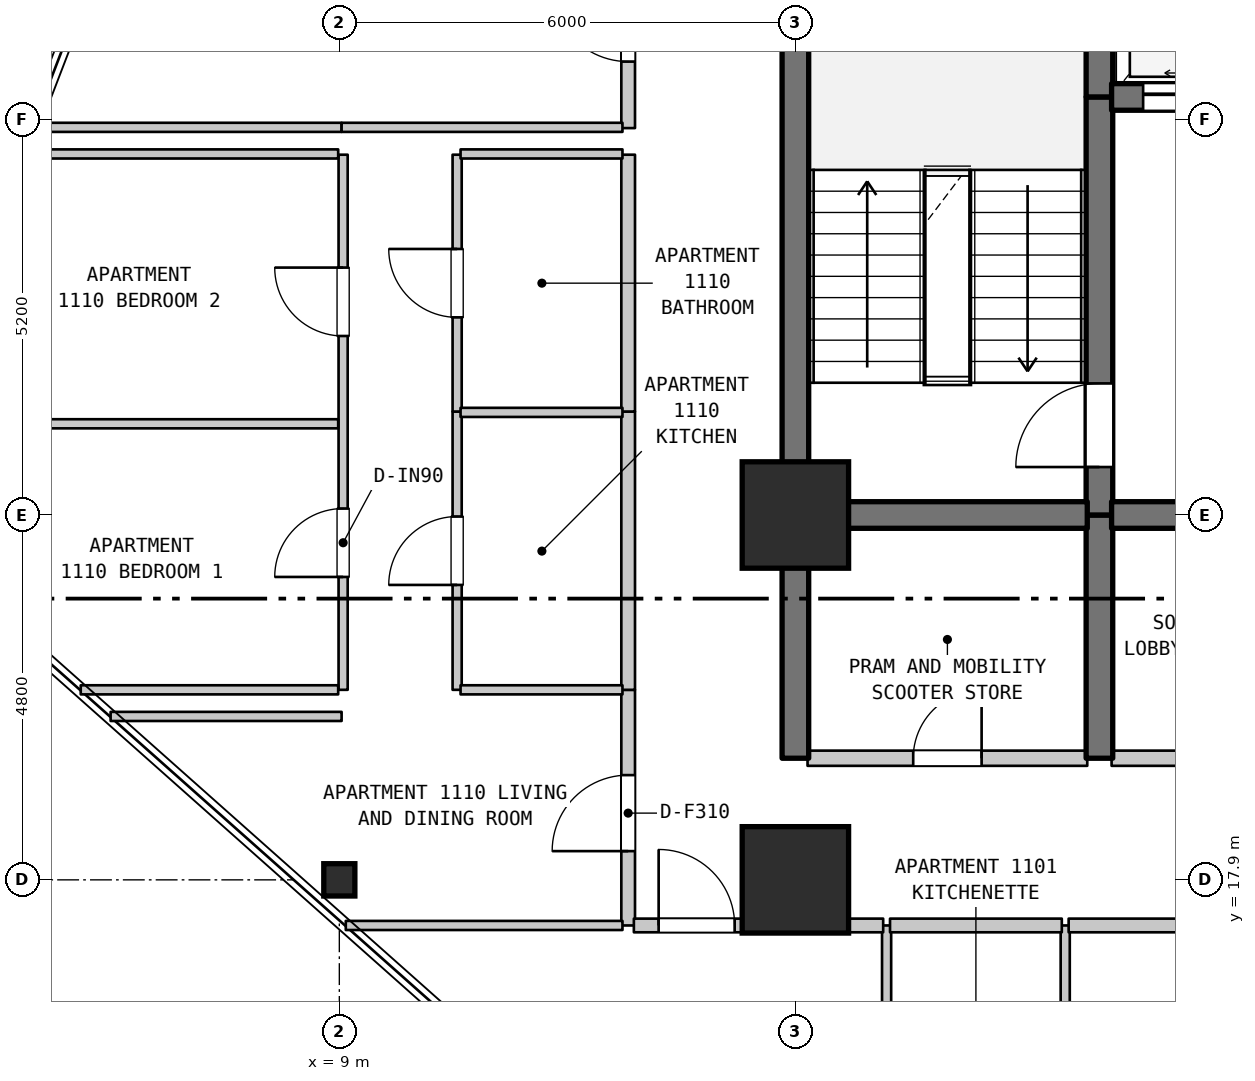
"""IFC4 building model, lengths in metres.
Left out: names, types, materials, properties, quantities, classifications, styles, units other than length and angle.
Written with IfcOpenShell. Run it as: python <this file> out.ifc"""

import sys

from ifc_helpers import new_model, si_unit, direction, frame, frame_2d, origin, origin_2d, place, context, subcontext, project, spatial, rectangle, i_section, extrude, element, fill, save


model = new_model("IFC4")
c1 = context("Model", 3, precision=1e-05, world=origin(), true_north=direction((0.0, 1.0)))
c2 = subcontext(c1, "Body", "Model", "MODEL_VIEW")
j1 = project(units=[si_unit("LENGTHUNIT", "METRE"), si_unit("PLANEANGLEUNIT", "RADIAN")], contexts=[c1])
p1 = place(None, origin())
s1 = spatial("IfcSite", under=j1, at=p1, CompositionType="ELEMENT")
p2 = place(p1, origin())
s2 = spatial("IfcBuilding", under=s1, at=p2, CompositionType="ELEMENT")
p3 = place(p2, frame((0.0, 0.0, 49.9)))
s3 = spatial("IfcBuildingStorey", under=s2, at=p3, CompositionType="ELEMENT", Elevation=49.9)
p4 = place(p3, frame((9.0, 17.9, 0.0), z_axis=(0.0, 0.0, 1.0), x_axis=(1.0, 0.0, 0.0)))
e1 = element("IfcColumn", 1, at=p4, inside=s3, PredefinedType="COLUMN", context=c2, shape_type="SweptSolid", body=[
    extrude(i_section(OverallWidth=0.409, OverallDepth=0.425, WebThickness=0.032, FlangeThickness=0.052, FilletRadius=0.015, at=origin_2d()), origin(), (0.0, 0.0, 1.0), 3.7),
])
for number, where, z_axis, x_axis in (
    (2, (15.0, 17.9, 0.0), (0.0, 0.0, 1.0), (1.0, 0.0, 0.0)),
    (3, (15.0, 22.7, 0.0), (0.0, 0.0, 1.0), (1.0, 0.0, 0.0)),
):
    element("IfcColumn", number, at=place(p3, frame(where, z_axis=z_axis, x_axis=x_axis)), inside=s3, PredefinedType="COLUMN", context=c2, shape_type="SweptSolid", body=[
        extrude(rectangle(XDim=1.4, YDim=1.4, at=origin_2d()), origin(), (0.0, 0.0, 1.0), 3.7),
    ])
p5 = place(p3, frame((9.05, 20.4, 0.0), z_axis=(0.0, 0.0, 1.0), x_axis=(0.0, 1.0, 0.0)))
e4 = element("IfcWall", 4, at=p5, inside=s3, PredefinedType="PARTITIONING", context=c2, shape_type="SweptSolid", body=[
    extrude(rectangle(XDim=7.04, YDim=0.12, at=frame_2d((3.52, 0.0))), origin(), (0.0, 0.0, 1.0), 2.785),
])
p6 = place(p5, frame((1.485, 0.0, 0.0)))
e5 = element("IfcOpeningElement", 5, at=p6, cuts=e4, PredefinedType="OPENING", context=c2, shape_type="SweptSolid", body=[
    extrude(rectangle(XDim=0.9, YDim=2.15, at=frame_2d((0.45, 1.075))), frame((0.0, 0.07, 0.0), z_axis=(0.0, -1.0, 0.0), x_axis=(1.0, 0.0, 0.0)), (0.0, 0.0, 1.0), 0.14),
])
p7 = place(p5, frame((4.655, 0.0, 0.0)))
e6 = element("IfcOpeningElement", 6, at=p7, cuts=e4, PredefinedType="OPENING", context=c2, shape_type="SweptSolid", body=[
    extrude(rectangle(XDim=0.9, YDim=2.15, at=frame_2d((0.45, 1.075))), frame((0.0, 0.07, 0.0), z_axis=(0.0, -1.0, 0.0), x_axis=(1.0, 0.0, 0.0)), (0.0, 0.0, 1.0), 0.14),
])
p8 = place(p3, frame((10.55, 20.4, 0.0), z_axis=(0.0, 0.0, 1.0), x_axis=(0.0, 1.0, 0.0)))
e7 = element("IfcWall", 7, at=p8, inside=s3, PredefinedType="PARTITIONING", context=c2, shape_type="SweptSolid", body=[
    extrude(rectangle(XDim=3.661, YDim=0.12, at=frame_2d((1.831, 0.0))), origin(), (0.0, 0.0, 1.0), 3.385),
])
p9 = place(p8, frame((1.38, 0.0, 0.0)))
e8 = element("IfcOpeningElement", 8, at=p9, cuts=e7, PredefinedType="OPENING", context=c2, shape_type="SweptSolid", body=[
    extrude(rectangle(XDim=0.9, YDim=2.15, at=frame_2d((0.45, 1.075))), frame((0.0, 0.07, 0.0), z_axis=(0.0, -1.0, 0.0), x_axis=(1.0, 0.0, 0.0)), (0.0, 0.0, 1.0), 0.14),
])
p10 = place(p3, frame((10.55, 24.061, 0.0), z_axis=(0.0, 0.0, 1.0), x_axis=(0.0, 1.0, 0.0)))
e9 = element("IfcWall", 9, at=p10, inside=s3, PredefinedType="PARTITIONING", context=c2, shape_type="SweptSolid", body=[
    extrude(rectangle(XDim=3.379, YDim=0.12, at=frame_2d((1.689, 0.0))), origin(), (0.0, 0.0, 1.0), 3.385),
])
p11 = place(p10, frame((1.239, 0.0, 0.0)))
e10 = element("IfcOpeningElement", 10, at=p11, cuts=e9, PredefinedType="OPENING", context=c2, shape_type="SweptSolid", body=[
    extrude(rectangle(XDim=0.9, YDim=2.1, at=frame_2d((0.45, 1.05))), frame((0.0, 0.07, 0.0), z_axis=(0.0, -1.0, 0.0), x_axis=(1.0, 0.0, 0.0)), (0.0, 0.0, 1.0), 0.14),
])
p12 = place(p3, frame((12.8, 17.3, 0.0), z_axis=(0.0, 0.0, 1.0), x_axis=(0.0, 1.0, 0.0)))
e11 = element("IfcWall", 11, at=p12, inside=s3, PredefinedType="STANDARD", context=c2, shape_type="SweptSolid", body=[
    extrude(rectangle(XDim=3.1, YDim=0.18, at=frame_2d((1.55, 0.0))), origin(), (0.0, 0.0, 1.0), 3.385),
])
p13 = place(p12, frame((0.978, 0.0, 0.0)))
e12 = element("IfcOpeningElement", 12, at=p13, cuts=e11, PredefinedType="OPENING", context=c2, shape_type="SweptSolid", body=[
    extrude(rectangle(XDim=1.0, YDim=2.15, at=frame_2d((0.5, 1.075))), frame((0.0, 0.1, 0.0), z_axis=(0.0, -1.0, 0.0), x_axis=(1.0, 0.0, 0.0)), (0.0, 0.0, 1.0), 0.2),
])
p14 = place(p3, frame((12.8, 20.4, 0.0), z_axis=(0.0, 0.0, 1.0), x_axis=(0.0, 1.0, 0.0)))
e13 = element("IfcWall", 13, at=p14, inside=s3, PredefinedType="STANDARD", context=c2, shape_type="SweptSolid", body=[
    extrude(rectangle(XDim=3.661, YDim=0.18, at=frame_2d((1.831, 0.0))), origin(), (0.0, 0.0, 1.0), 3.385),
])
p15 = place(p3, frame((12.8, 24.061, 0.0), z_axis=(0.0, 0.0, 1.0), x_axis=(0.0, 1.0, 0.0)))
e14 = element("IfcWall", 14, at=p15, inside=s3, PredefinedType="STANDARD", context=c2, shape_type="SweptSolid", body=[
    extrude(rectangle(XDim=3.379, YDim=0.18, at=frame_2d((1.689, 0.0))), origin(), (0.0, 0.0, 1.0), 3.385),
])
p16 = place(p3, frame((12.8, 27.79, 0.0), z_axis=(0.0, 0.0, 1.0), x_axis=(0.0, 1.0, 0.0)))
e15 = element("IfcWall", 15, at=p16, inside=s3, PredefinedType="STANDARD", context=c2, shape_type="SweptSolid", body=[
    extrude(rectangle(XDim=2.75, YDim=0.18, at=frame_2d((1.375, 0.0))), origin(), (0.0, 0.0, 1.0), 3.385),
])
p17 = place(p16, frame((0.875, 0.0, 0.0)))
e16 = element("IfcOpeningElement", 16, at=p17, cuts=e15, PredefinedType="OPENING", context=c2, shape_type="SweptSolid", body=[
    extrude(rectangle(XDim=1.0, YDim=2.15, at=frame_2d((0.5, 1.075))), frame((0.0, 0.1, 0.0), z_axis=(0.0, -1.0, 0.0), x_axis=(1.0, 0.0, 0.0)), (0.0, 0.0, 1.0), 0.2),
])
p18 = place(p3, frame((15.0, 19.5, 0.0), z_axis=(0.0, 0.0, 1.0), x_axis=(0.0, 1.0, 0.0)))
e17 = element("IfcWall", 17, at=p18, inside=s3, PredefinedType="SHEAR", context=c2, shape_type="SweptSolid", body=[
    extrude(rectangle(XDim=3.2, YDim=0.35, at=frame_2d((1.6, 0.0))), origin(), (0.0, 0.0, 1.0), 3.385),
])
p19 = place(p3, frame((15.0, 22.7, 0.0), z_axis=(0.0, 0.0, 1.0), x_axis=(0.0, 1.0, 0.0)))
e18 = element("IfcWall", 18, at=p19, inside=s3, PredefinedType="SHEAR", context=c2, shape_type="SweptSolid", body=[
    extrude(rectangle(XDim=6.8, YDim=0.35, at=frame_2d((3.4, 0.0))), origin(), (0.0, 0.0, 1.0), 3.385),
])
p20 = place(p3, frame((16.2, 14.1, 0.0), z_axis=(0.0, 0.0, 1.0), x_axis=(0.0, 1.0, 0.0)))
e19 = element("IfcWall", 19, at=p20, inside=s3, PredefinedType="PARTITIONING", context=c2, shape_type="SweptSolid", body=[
    extrude(rectangle(XDim=3.2, YDim=0.12, at=frame_2d((1.6, 0.0))), origin(), (0.0, 0.0, 1.0), 3.385),
])
p21 = place(p20, frame((1.15, 0.0, 0.0)))
e20 = element("IfcOpeningElement", 20, at=p21, cuts=e19, PredefinedType="OPENING", context=c2, shape_type="SweptSolid", body=[
    extrude(rectangle(XDim=0.9, YDim=2.15, at=frame_2d((0.45, 1.075))), frame((0.0, 0.07, 0.0), z_axis=(0.0, -1.0, 0.0), x_axis=(1.0, 0.0, 0.0)), (0.0, 0.0, 1.0), 0.14),
])
p22 = place(p3, frame((18.55, 14.1, 0.0), z_axis=(0.0, 0.0, 1.0), x_axis=(0.0, 1.0, 0.0)))
e21 = element("IfcWall", 21, at=p22, inside=s3, PredefinedType="PARTITIONING", context=c2, shape_type="SweptSolid", body=[
    extrude(rectangle(XDim=3.2, YDim=0.12, at=frame_2d((1.6, 0.0))), origin(), (0.0, 0.0, 1.0), 3.385),
])
p23 = place(p3, frame((19.0, 19.5, 0.0), z_axis=(0.0, 0.0, 1.0), x_axis=(0.0, 1.0, 0.0)))
e22 = element("IfcWall", 22, at=p23, inside=s3, PredefinedType="SHEAR", context=c2, shape_type="SweptSolid", body=[
    extrude(rectangle(XDim=3.2, YDim=0.35, at=frame_2d((1.6, 0.0))), origin(), (0.0, 0.0, 1.0), 3.385),
])
p24 = place(p3, frame((19.0, 22.7, 0.0), z_axis=(0.0, 0.0, 1.0), x_axis=(0.0, 1.0, 0.0)))
e23 = element("IfcWall", 23, at=p24, inside=s3, PredefinedType="SHEAR", context=c2, shape_type="SweptSolid", body=[
    extrude(rectangle(XDim=5.5, YDim=0.35, at=frame_2d((2.75, 0.0))), origin(), (0.0, 0.0, 1.0), 3.385),
])
p25 = place(p24, frame((0.631, 0.0, 0.0)))
e24 = element("IfcOpeningElement", 24, at=p25, cuts=e23, PredefinedType="OPENING", context=c2, shape_type="SweptSolid", body=[
    extrude(rectangle(XDim=1.1, YDim=2.15, at=frame_2d((0.55, 1.075))), frame((0.0, 0.185, 0.0), z_axis=(0.0, -1.0, 0.0), x_axis=(1.0, 0.0, 0.0)), (0.0, 0.0, 1.0), 0.37),
])
p26 = place(p3, frame((19.0, 28.2, 0.0), z_axis=(0.0, 0.0, 1.0), x_axis=(0.0, 1.0, 0.0)))
e25 = element("IfcWall", 25, at=p26, inside=s3, PredefinedType="SHEAR", context=c2, shape_type="SweptSolid", body=[
    extrude(rectangle(XDim=1.3, YDim=0.35, at=frame_2d((0.65, 0.0))), origin(), (0.0, 0.0, 1.0), 3.385),
])
p27 = place(p3, frame((9.085, 17.3, 0.0), z_axis=(0.0, 0.0, 1.0), x_axis=(1.0, 0.0, 0.0)))
e26 = element("IfcWall", 26, at=p27, inside=s3, PredefinedType="PARTITIONING", context=c2, shape_type="SweptSolid", body=[
    extrude(rectangle(XDim=3.64, YDim=0.12, at=frame_2d((1.82, 0.0))), origin(), (0.0, 0.0, 1.0), 3.385),
])
p28 = place(p3, frame((12.875, 17.3, 0.0), z_axis=(0.0, 0.0, 1.0), x_axis=(1.0, 0.0, 0.0)))
e27 = element("IfcWall", 27, at=p28, inside=s3, PredefinedType="STANDARD", context=c2, shape_type="SweptSolid", body=[
    extrude(rectangle(XDim=3.28, YDim=0.18, at=frame_2d((1.64, 0.0))), origin(), (0.0, 0.0, 1.0), 3.385),
])
p29 = place(p28, frame((0.326, 0.0, 0.0)))
e28 = element("IfcOpeningElement", 28, at=p29, cuts=e27, PredefinedType="OPENING", context=c2, shape_type="SweptSolid", body=[
    extrude(rectangle(XDim=1.0, YDim=2.15, at=frame_2d((0.5, 1.075))), frame((0.0, 0.1, 0.0), z_axis=(0.0, -1.0, 0.0), x_axis=(1.0, 0.0, 0.0)), (0.0, 0.0, 1.0), 0.2),
])
p30 = place(p3, frame((16.245, 17.3, 0.0), z_axis=(0.0, 0.0, 1.0), x_axis=(1.0, 0.0, 0.0)))
e29 = element("IfcWall", 29, at=p30, inside=s3, PredefinedType="STANDARD", context=c2, shape_type="SweptSolid", body=[
    extrude(rectangle(XDim=2.26, YDim=0.18, at=frame_2d((1.13, 0.0))), origin(), (0.0, 0.0, 1.0), 3.385),
])
p31 = place(p3, frame((18.595, 17.3, 0.0), z_axis=(0.0, 0.0, 1.0), x_axis=(1.0, 0.0, 0.0)))
e30 = element("IfcWall", 30, at=p31, inside=s3, PredefinedType="STANDARD", context=c2, shape_type="SweptSolid", body=[
    extrude(rectangle(XDim=1.86, YDim=0.18, at=frame_2d((0.93, 0.0))), origin(), (0.0, 0.0, 1.0), 3.385),
])
p32 = place(p3, frame((15.16, 19.5, 0.0), z_axis=(0.0, 0.0, 1.0), x_axis=(1.0, 0.0, 0.0)))
e31 = element("IfcWall", 31, at=p32, inside=s3, PredefinedType="STANDARD", context=c2, shape_type="SweptSolid", body=[
    extrude(rectangle(XDim=3.68, YDim=0.2, at=frame_2d((1.84, 0.0))), origin(), (0.0, 0.0, 1.0), 3.385),
])
p33 = place(p32, frame((1.39, 0.0, 0.0)))
e32 = element("IfcOpeningElement", 32, at=p33, cuts=e31, PredefinedType="OPENING", context=c2, shape_type="SweptSolid", body=[
    extrude(rectangle(XDim=0.9, YDim=2.15, at=frame_2d((0.45, 1.075))), frame((0.0, 0.11, 0.0), z_axis=(0.0, -1.0, 0.0), x_axis=(1.0, 0.0, 0.0)), (0.0, 0.0, 1.0), 0.22),
])
p34 = place(p3, frame((19.16, 19.5, 0.0), z_axis=(0.0, 0.0, 1.0), x_axis=(1.0, 0.0, 0.0)))
e33 = element("IfcWall", 33, at=p34, inside=s3, PredefinedType="STANDARD", context=c2, shape_type="SweptSolid", body=[
    extrude(rectangle(XDim=4.48, YDim=0.2, at=frame_2d((2.24, 0.0))), origin(), (0.0, 0.0, 1.0), 3.385),
])
p35 = place(p34, frame((1.64, 0.0, 0.0)))
e34 = element("IfcOpeningElement", 34, at=p35, cuts=e33, PredefinedType="OPENING", context=c2, shape_type="SweptSolid", body=[
    extrude(rectangle(XDim=1.2, YDim=2.2, at=frame_2d((0.6, 1.1))), frame((0.0, 0.11, 0.0), z_axis=(0.0, -1.0, 0.0), x_axis=(1.0, 0.0, 0.0)), (0.0, 0.0, 1.0), 0.22),
])
p36 = place(p3, frame((5.991, 20.05, 0.0), z_axis=(0.0, 0.0, 1.0), x_axis=(1.0, 0.0, 0.0)))
e35 = element("IfcWall", 35, at=p36, inside=s3, PredefinedType="PARTITIONING", context=c2, shape_type="SweptSolid", body=[
    extrude(rectangle(XDim=3.039, YDim=0.12, at=frame_2d((1.52, 0.0))), origin(), (0.0, 0.0, 1.0), 3.385),
])
p37 = place(p3, frame((5.598, 20.4, 0.0), z_axis=(0.0, 0.0, 1.0), x_axis=(1.0, 0.0, 0.0)))
e36 = element("IfcWall", 36, at=p37, inside=s3, PredefinedType="PARTITIONING", context=c2, shape_type="SweptSolid", body=[
    extrude(rectangle(XDim=3.387, YDim=0.12, at=frame_2d((1.694, 0.0))), origin(), (0.0, 0.0, 1.0), 3.385),
])
p38 = place(p3, frame((10.595, 20.4, 0.0), z_axis=(0.0, 0.0, 1.0), x_axis=(1.0, 0.0, 0.0)))
e37 = element("IfcWall", 37, at=p38, inside=s3, PredefinedType="PARTITIONING", context=c2, shape_type="SweptSolid", body=[
    extrude(rectangle(XDim=2.13, YDim=0.12, at=frame_2d((1.065, 0.0))), origin(), (0.0, 0.0, 1.0), 3.385),
])
p39 = place(p3, frame((15.16, 22.7, 0.0), z_axis=(0.0, 0.0, 1.0), x_axis=(1.0, 0.0, 0.0)))
e38 = element("IfcWall", 38, at=p39, inside=s3, PredefinedType="SHEAR", context=c2, shape_type="SweptSolid", body=[
    extrude(rectangle(XDim=3.68, YDim=0.35, at=frame_2d((1.84, 0.0))), origin(), (0.0, 0.0, 1.0), 3.385),
])
p40 = place(p3, frame((19.16, 22.7, 0.0), z_axis=(0.0, 0.0, 1.0), x_axis=(1.0, 0.0, 0.0)))
e39 = element("IfcWall", 39, at=p40, inside=s3, PredefinedType="SHEAR", context=c2, shape_type="SweptSolid", body=[
    extrude(rectangle(XDim=4.48, YDim=0.35, at=frame_2d((2.24, 0.0))), origin(), (0.0, 0.0, 1.0), 3.385),
])
p41 = place(p40, frame((1.64, 0.0, 0.0)))
e40 = element("IfcOpeningElement", 40, at=p41, cuts=e39, PredefinedType="OPENING", context=c2, shape_type="SweptSolid", body=[
    extrude(rectangle(XDim=1.2, YDim=2.2, at=frame_2d((0.6, 1.1))), frame((0.0, 0.185, 0.0), z_axis=(0.0, -1.0, 0.0), x_axis=(1.0, 0.0, 0.0)), (0.0, 0.0, 1.0), 0.37),
])
p42 = place(p3, frame((3.501, 23.9, 0.0), z_axis=(0.0, 0.0, 1.0), x_axis=(1.0, 0.0, 0.0)))
e41 = element("IfcWall", 41, at=p42, inside=s3, PredefinedType="PARTITIONING", context=c2, shape_type="SweptSolid", body=[
    extrude(rectangle(XDim=5.484, YDim=0.12, at=frame_2d((2.742, 0.0))), origin(), (0.0, 0.0, 1.0), 3.385),
])
p43 = place(p3, frame((10.595, 24.05, 0.0), z_axis=(0.0, 0.0, 1.0), x_axis=(1.0, 0.0, 0.0)))
e42 = element("IfcWall", 42, at=p43, inside=s3, PredefinedType="PARTITIONING", context=c2, shape_type="SweptSolid", body=[
    extrude(rectangle(XDim=2.13, YDim=0.12, at=frame_2d((1.065, 0.0))), origin(), (0.0, 0.0, 1.0), 3.385),
])
p44 = place(p3, frame((4.837, 27.45, 0.0), z_axis=(0.0, 0.0, 1.0), x_axis=(1.0, 0.0, 0.0)))
e43 = element("IfcWall", 43, at=p44, inside=s3, PredefinedType="PARTITIONING", context=c2, shape_type="SweptSolid", body=[
    extrude(rectangle(XDim=4.148, YDim=0.12, at=frame_2d((2.074, 0.0))), origin(), (0.0, 0.0, 1.0), 3.385),
])
p45 = place(p3, frame((10.595, 27.45, 0.0), z_axis=(0.0, 0.0, 1.0), x_axis=(1.0, 0.0, 0.0)))
e44 = element("IfcWall", 44, at=p45, inside=s3, PredefinedType="PARTITIONING", context=c2, shape_type="SweptSolid", body=[
    extrude(rectangle(XDim=2.13, YDim=0.12, at=frame_2d((1.065, 0.0))), origin(), (0.0, 0.0, 1.0), 3.385),
])
p46 = place(p3, frame((4.971, 27.8, 0.0), z_axis=(0.0, 0.0, 1.0), x_axis=(1.0, 0.0, 0.0)))
e45 = element("IfcWall", 45, at=p46, inside=s3, PredefinedType="PARTITIONING", context=c2, shape_type="SweptSolid", body=[
    extrude(rectangle(XDim=4.059, YDim=0.12, at=frame_2d((2.03, 0.0))), origin(), (0.0, 0.0, 1.0), 3.385),
])
p47 = place(p3, frame((9.03, 27.8, 0.0), z_axis=(0.0, 0.0, 1.0), x_axis=(1.0, 0.0, 0.0)))
e46 = element("IfcWall", 46, at=p47, inside=s3, PredefinedType="PARTITIONING", context=c2, shape_type="SweptSolid", body=[
    extrude(rectangle(XDim=3.695, YDim=0.12, at=frame_2d((1.848, 0.0))), origin(), (0.0, 0.0, 1.0), 3.385),
])
p48 = place(p3, frame((19.16, 28.2, 0.0), z_axis=(0.0, 0.0, 1.0), x_axis=(1.0, 0.0, 0.0)))
e47 = element("IfcWall", 47, at=p48, inside=s3, PredefinedType="SHEAR", context=c2, shape_type="SweptSolid", body=[
    extrude(rectangle(XDim=4.48, YDim=0.35, at=frame_2d((2.24, 0.0))), origin(), (0.0, 0.0, 1.0), 3.385),
])
p49 = place(p48, frame((0.415, 0.0, 0.0)))
e48 = element("IfcOpeningElement", 48, at=p49, cuts=e47, PredefinedType="OPENING", context=c2, shape_type="SweptSolid", body=[
    extrude(rectangle(XDim=1.25, YDim=2.2, at=frame_2d((0.625, 1.1))), frame((0.0, 0.185, 0.0), z_axis=(0.0, -1.0, 0.0), x_axis=(1.0, 0.0, 0.0)), (0.0, 0.0, 1.0), 0.37),
])
p50 = place(p48, frame((2.815, 0.0, 0.0)))
e49 = element("IfcOpeningElement", 49, at=p50, cuts=e47, PredefinedType="OPENING", context=c2, shape_type="SweptSolid", body=[
    extrude(rectangle(XDim=1.25, YDim=2.2, at=frame_2d((0.625, 1.1))), frame((0.0, 0.185, 0.0), z_axis=(0.0, -1.0, 0.0), x_axis=(1.0, 0.0, 0.0)), (0.0, 0.0, 1.0), 0.37),
])
p51 = place(p6, origin())
e50 = element("IfcDoor", 50, at=p51, inside=s3, OperationType="SINGLE_SWING_LEFT", PredefinedType="DOOR", context=c2, shape_type="SweptSolid", body=[
    extrude(rectangle(XDim=0.9, YDim=2.15, at=frame_2d((0.45, 1.075))), frame((0.0, 0.025, 0.0), z_axis=(0.0, -1.0, 0.0), x_axis=(1.0, 0.0, 0.0)), (0.0, 0.0, 1.0), 0.05),
])
fill(e5, e50)
p52 = place(p7, origin())
e51 = element("IfcDoor", 51, at=p52, inside=s3, OperationType="SINGLE_SWING_RIGHT", PredefinedType="DOOR", context=c2, shape_type="SweptSolid", body=[
    extrude(rectangle(XDim=0.9, YDim=2.15, at=frame_2d((0.45, 1.075))), frame((0.0, 0.025, 0.0), z_axis=(0.0, -1.0, 0.0), x_axis=(1.0, 0.0, 0.0)), (0.0, 0.0, 1.0), 0.05),
])
fill(e6, e51)
p53 = place(p9, origin())
e52 = element("IfcDoor", 52, at=p53, inside=s3, OperationType="SINGLE_SWING_LEFT", PredefinedType="DOOR", context=c2, shape_type="SweptSolid", body=[
    extrude(rectangle(XDim=0.9, YDim=2.15, at=frame_2d((0.45, 1.075))), frame((0.0, 0.025, 0.0), z_axis=(0.0, -1.0, 0.0), x_axis=(1.0, 0.0, 0.0)), (0.0, 0.0, 1.0), 0.05),
])
fill(e8, e52)
p54 = place(p11, origin())
e53 = element("IfcDoor", 53, at=p54, inside=s3, OperationType="SINGLE_SWING_RIGHT", PredefinedType="DOOR", context=c2, shape_type="SweptSolid", body=[
    extrude(rectangle(XDim=0.9, YDim=2.1, at=frame_2d((0.45, 1.05))), frame((0.0, 0.025, 0.0), z_axis=(0.0, -1.0, 0.0), x_axis=(1.0, 0.0, 0.0)), (0.0, 0.0, 1.0), 0.05),
])
fill(e10, e53)
p55 = place(p13, origin())
e54 = element("IfcDoor", 54, at=p55, inside=s3, OperationType="SINGLE_SWING_LEFT", PredefinedType="DOOR", context=c2, shape_type="SweptSolid", body=[
    extrude(rectangle(XDim=1.0, YDim=2.15, at=frame_2d((0.5, 1.075))), frame((0.0, 0.025, 0.0), z_axis=(0.0, -1.0, 0.0), x_axis=(1.0, 0.0, 0.0)), (0.0, 0.0, 1.0), 0.05),
])
fill(e12, e54)
p56 = place(p17, origin())
e55 = element("IfcDoor", 55, at=p56, inside=s3, OperationType="SINGLE_SWING_RIGHT", PredefinedType="DOOR", context=c2, shape_type="SweptSolid", body=[
    extrude(rectangle(XDim=1.0, YDim=2.15, at=frame_2d((0.5, 1.075))), frame((0.0, 0.025, 0.0), z_axis=(0.0, -1.0, 0.0), x_axis=(1.0, 0.0, 0.0)), (0.0, 0.0, 1.0), 0.05),
])
fill(e16, e55)
p57 = place(p25, origin())
e56 = element("IfcDoor", 56, at=p57, inside=s3, OperationType="SINGLE_SWING_LEFT", PredefinedType="DOOR", context=c2, shape_type="SweptSolid", body=[
    extrude(rectangle(XDim=1.1, YDim=2.15, at=frame_2d((0.55, 1.075))), frame((0.0, 0.025, 0.0), z_axis=(0.0, -1.0, 0.0), x_axis=(1.0, 0.0, 0.0)), (0.0, 0.0, 1.0), 0.05),
])
fill(e24, e56)
p58 = place(p29, origin())
e57 = element("IfcDoor", 57, at=p58, inside=s3, OperationType="SINGLE_SWING_LEFT", PredefinedType="DOOR", context=c2, shape_type="SweptSolid", body=[
    extrude(rectangle(XDim=1.0, YDim=2.15, at=frame_2d((0.5, 1.075))), frame((0.0, 0.025, 0.0), z_axis=(0.0, -1.0, 0.0), x_axis=(1.0, 0.0, 0.0)), (0.0, 0.0, 1.0), 0.05),
])
fill(e28, e57)
p59 = place(p33, origin())
e58 = element("IfcDoor", 58, at=p59, inside=s3, OperationType="SINGLE_SWING_RIGHT", PredefinedType="DOOR", context=c2, shape_type="SweptSolid", body=[
    extrude(rectangle(XDim=0.9, YDim=2.15, at=frame_2d((0.45, 1.075))), frame((0.0, 0.025, 0.0), z_axis=(0.0, -1.0, 0.0), x_axis=(1.0, 0.0, 0.0)), (0.0, 0.0, 1.0), 0.05),
])
fill(e32, e58)
p60 = place(p49, origin())
e59 = element("IfcDoor", 59, at=p60, inside=s3, OperationType="DOUBLE_DOOR_SLIDING", PredefinedType="DOOR", context=c2, shape_type="SweptSolid", body=[
    extrude(rectangle(XDim=1.25, YDim=2.2, at=frame_2d((0.625, 1.1))), frame((0.0, 0.025, 0.0), z_axis=(0.0, -1.0, 0.0), x_axis=(1.0, 0.0, 0.0)), (0.0, 0.0, 1.0), 0.05),
])
fill(e48, e59)
save(model, sys.argv[1])
